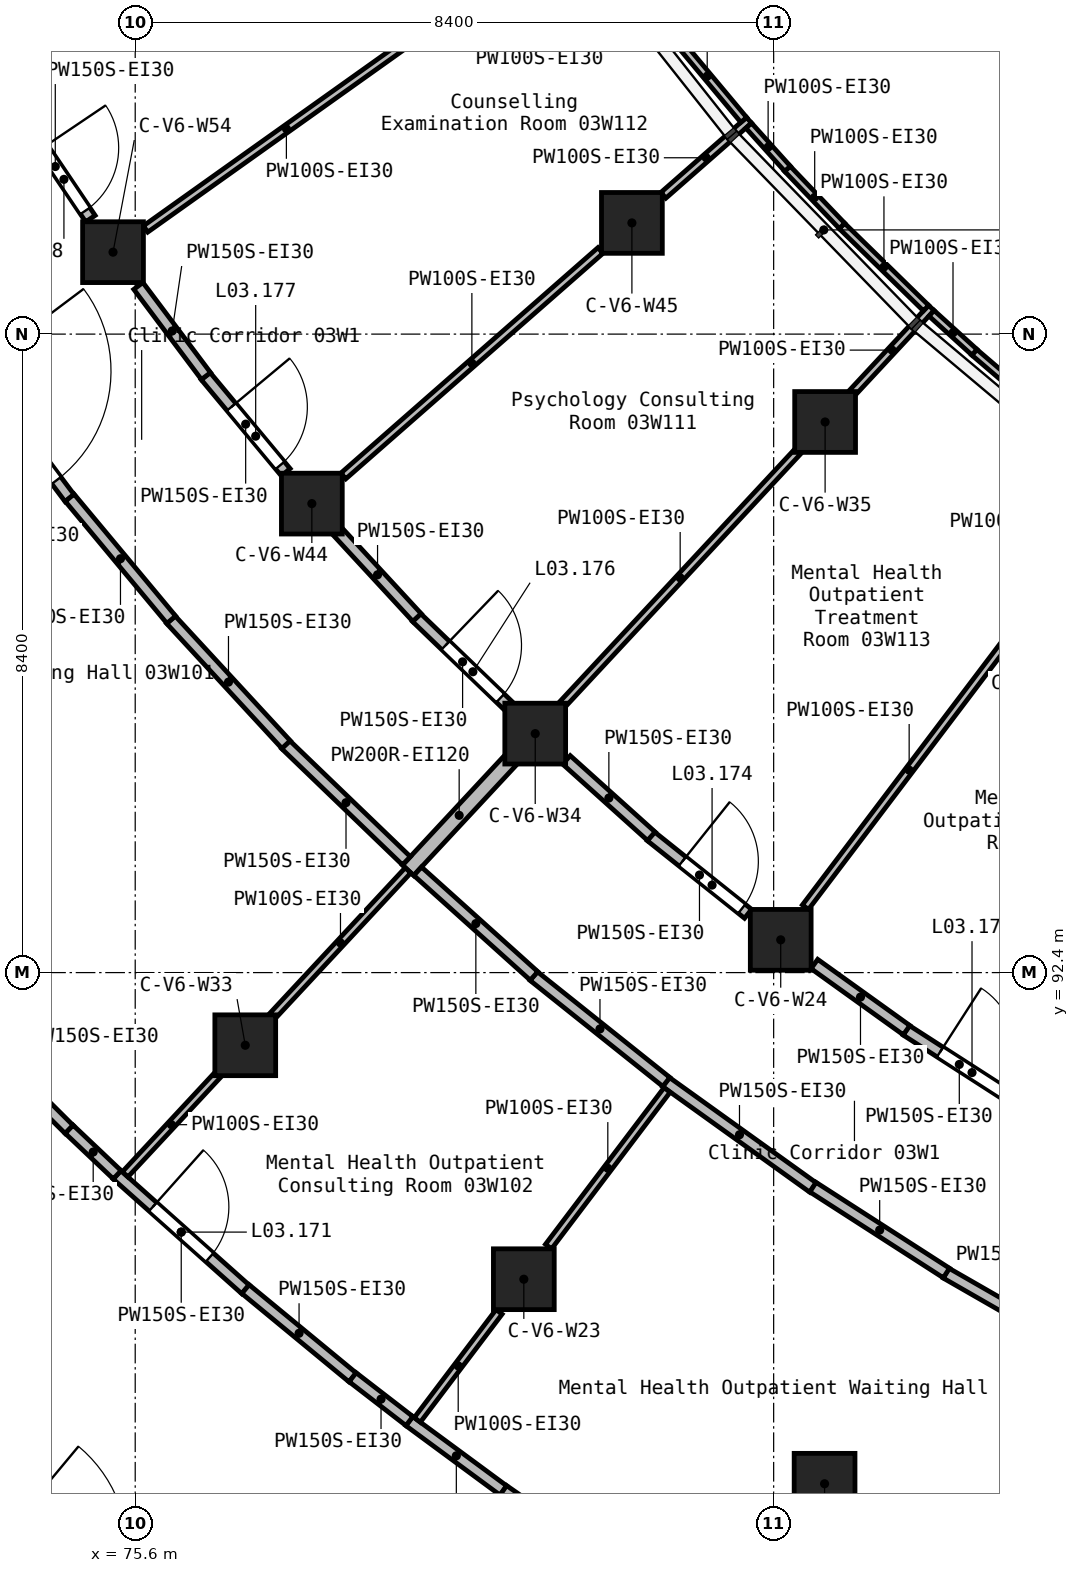
"""IFC4 building model, lengths in metres.
Left out: names, types, materials, properties, quantities, classifications, styles, units other than length and angle.
Written with IfcOpenShell. Run it as: python <this file> out.ifc"""

import sys

from ifc_helpers import new_model, si_unit, direction, frame, frame_2d, origin, origin_2d, place, context, subcontext, project, spatial, rectangle, extrude, element, fill, save


model = new_model("IFC4")
c1 = context("Model", 3, precision=1e-05, world=origin(), true_north=direction((0.0, 1.0)))
c2 = subcontext(c1, "Body", "Model", "MODEL_VIEW")
j1 = project(units=[si_unit("LENGTHUNIT", "METRE"), si_unit("PLANEANGLEUNIT", "RADIAN")], contexts=[c1])
p1 = place(None, origin())
s1 = spatial("IfcSite", under=j1, at=p1, CompositionType="ELEMENT")
p2 = place(p1, origin())
s2 = spatial("IfcBuilding", under=s1, at=p2, CompositionType="ELEMENT")
p3 = place(p2, frame((0.0, 0.0, 16.8)))
s3 = spatial("IfcBuildingStorey", under=s2, at=p3, CompositionType="ELEMENT", Elevation=16.8)
for number, where, z_axis, x_axis in (
    (1, (75.308, 101.878, 0.0), (0.0, 0.0, 1.0), (1.0, 0.0, 0.0)),
    (2, (77.048, 91.444, 0.0), (0.0, 0.0, 1.0), (1.0, 0.0, 0.0)),
    (3, (77.924, 98.57, 0.0), (0.0, 0.0, 1.0), (1.0, 0.0, 0.0)),
    (4, (80.713, 88.366, 0.0), (0.0, 0.0, 1.0), (1.0, 0.0, 0.0)),
    (5, (80.863, 95.544, 0.0), (0.0, 0.0, 1.0), (1.0, 0.0, 0.0)),
    (6, (82.135, 102.263, 0.0), (0.0, 0.0, 1.0), (1.0, 0.0, 0.0)),
    (7, (84.093, 92.831, 0.0), (0.0, 0.0, 1.0), (1.0, 0.0, 0.0)),
    (8, (84.67, 85.675, 0.0), (0.0, 0.0, 1.0), (1.0, 0.0, 0.0)),
    (9, (84.677, 99.644, 0.0), (0.0, 0.0, 1.0), (1.0, 0.0, 0.0)),
):
    element("IfcColumn", number, at=place(p3, frame(where, z_axis=z_axis, x_axis=x_axis)), inside=s3, PredefinedType="COLUMN", context=c2, shape_type="SweptSolid", body=[
        extrude(rectangle(XDim=0.8, YDim=0.8, at=origin_2d()), origin(), (0.0, 0.0, 1.0), 4.2),
    ])
p4 = place(p3, frame((79.19, 93.746, 0.0), z_axis=(0.0, 0.0, 1.0), x_axis=(0.681171780306, 0.732123627344, 0.0)))
e10 = element("IfcWall", 10, at=p4, inside=s3, PredefinedType="SOLIDWALL", context=c2, shape_type="SweptSolid", body=[
    extrude(rectangle(XDim=1.974, YDim=0.2, at=frame_2d((0.987, 0.0))), origin(), (0.0, 0.0, 1.0), 3.9),
])
p5 = place(p3, frame((73.307, 100.547, 0.0), z_axis=(0.0, 0.0, 1.0), x_axis=(0.600377090661, -0.799717043091, 0.0)))
e11 = element("IfcWall", 11, at=p5, inside=s3, PredefinedType="PARTITIONING", context=c2, shape_type="SweptSolid", body=[
    extrude(rectangle(XDim=2.382, YDim=0.15, at=frame_2d((1.191, 0.0))), origin(), (0.0, 0.0, 1.0), 3.9),
])
p6 = place(p5, frame((0.291, 0.0, 0.0)))
e12 = element("IfcOpeningElement", 12, at=p6, cuts=e11, PredefinedType="OPENING", context=c2, shape_type="SweptSolid", body=[
    extrude(rectangle(XDim=1.8, YDim=2.1, at=frame_2d((0.9, 1.05))), frame((0.0, 0.085, 0.0), z_axis=(0.0, -1.0, 0.0), x_axis=(1.0, 0.0, 0.0)), (0.0, 0.0, 1.0), 0.17),
])
p7 = place(p3, frame((82.583, 90.961, 0.0), z_axis=(0.0, 0.0, 1.0), x_axis=(0.812456963848, -0.583021167622, 0.0)))
e13 = element("IfcWall", 13, at=p7, inside=s3, PredefinedType="PARTITIONING", context=c2, shape_type="SweptSolid", body=[
    extrude(rectangle(XDim=2.381, YDim=0.15, at=frame_2d((1.191, 0.0))), origin(), (0.0, 0.0, 1.0), 3.9),
])
p8 = place(p3, frame((80.841, 92.356, 0.0), z_axis=(0.0, 0.0, 1.0), x_axis=(0.781561025488, -0.62382879337, 0.0)))
e14 = element("IfcWall", 14, at=p8, inside=s3, PredefinedType="PARTITIONING", context=c2, shape_type="SweptSolid", body=[
    extrude(rectangle(XDim=2.235, YDim=0.15, at=frame_2d((1.118, 0.0))), origin(), (0.0, 0.0, 1.0), 3.9),
])
p9 = place(p3, frame((77.579, 95.4, 0.0), z_axis=(0.0, 0.0, 1.0), x_axis=(0.720594722174, -0.693356507415, 0.0)))
e15 = element("IfcWall", 15, at=p9, inside=s3, PredefinedType="PARTITIONING", context=c2, shape_type="SweptSolid", body=[
    extrude(rectangle(XDim=2.205, YDim=0.15, at=frame_2d((1.103, 0.0))), origin(), (0.0, 0.0, 1.0), 3.9),
])
p10 = place(p3, frame((76.069, 97.043, 0.0), z_axis=(0.0, 0.0, 1.0), x_axis=(0.678030610295, -0.735033666918, 0.0)))
e16 = element("IfcWall", 16, at=p10, inside=s3, PredefinedType="PARTITIONING", context=c2, shape_type="SweptSolid", body=[
    extrude(rectangle(XDim=2.236, YDim=0.15, at=frame_2d((1.118, 0.0))), origin(), (0.0, 0.0, 1.0), 3.9),
])
p11 = place(p3, frame((86.268, 88.446, 0.0), z_axis=(0.0, 0.0, 1.0), x_axis=(0.867212921502, -0.497937494852, 0.0)))
e17 = element("IfcWall", 17, at=p11, inside=s3, PredefinedType="PARTITIONING", context=c2, shape_type="SweptSolid", body=[
    extrude(rectangle(XDim=2.235, YDim=0.15, at=frame_2d((1.118, 0.0))), origin(), (0.0, 0.0, 1.0), 3.9),
])
p12 = place(p3, frame((79.316, 93.733, 0.0), z_axis=(0.0, 0.0, 1.0), x_axis=(0.74346507851, -0.668774758073, 0.0)))
e18 = element("IfcWall", 18, at=p12, inside=s3, PredefinedType="PARTITIONING", context=c2, shape_type="SweptSolid", body=[
    extrude(rectangle(XDim=2.059, YDim=0.15, at=frame_2d((1.03, 0.0))), origin(), (0.0, 0.0, 1.0), 3.9),
])
p13 = place(p3, frame((74.738, 98.647, 0.0), z_axis=(0.0, 0.0, 1.0), x_axis=(0.640000381719, -0.768374590548, 0.0)))
e19 = element("IfcWall", 19, at=p13, inside=s3, PredefinedType="PARTITIONING", context=c2, shape_type="SweptSolid", body=[
    extrude(rectangle(XDim=2.088, YDim=0.15, at=frame_2d((1.044, 0.0))), origin(), (0.0, 0.0, 1.0), 3.9),
])
p14 = place(p3, frame((84.517, 89.577, 0.0), z_axis=(0.0, 0.0, 1.0), x_axis=(0.840935250807, -0.541135753717, 0.0)))
e20 = element("IfcWall", 20, at=p14, inside=s3, PredefinedType="PARTITIONING", context=c2, shape_type="SweptSolid", body=[
    extrude(rectangle(XDim=2.088, YDim=0.15, at=frame_2d((1.044, 0.0))), origin(), (0.0, 0.0, 1.0), 3.9),
])
p15 = place(p3, frame((75.36, 89.74, 0.0), z_axis=(0.0, 0.0, 1.0), x_axis=(0.746361982095, -0.665540225443, 0.0)))
e21 = element("IfcWall", 21, at=p15, inside=s3, PredefinedType="PARTITIONING", context=c2, shape_type="SweptSolid", body=[
    extrude(rectangle(XDim=2.266, YDim=0.15, at=frame_2d((1.133, 0.0))), origin(), (0.0, 0.0, 1.0), 3.9),
])
p16 = place(p15, frame((0.633, 0.0, 0.0)))
e22 = element("IfcOpeningElement", 22, at=p16, cuts=e21, PredefinedType="OPENING", context=c2, shape_type="SweptSolid", body=[
    extrude(rectangle(XDim=1.0, YDim=2.1, at=frame_2d((0.5, 1.05))), frame((0.0, 0.085, 0.0), z_axis=(0.0, -1.0, 0.0), x_axis=(1.0, 0.0, 0.0)), (0.0, 0.0, 1.0), 0.17),
])
p17 = place(p3, frame((74.086, 103.69, 0.0), z_axis=(0.0, 0.0, 1.0), x_axis=(0.558985889655, -0.829177167538, 0.0)))
e23 = element("IfcWall", 23, at=p17, inside=s3, PredefinedType="PARTITIONING", context=c2, shape_type="SweptSolid", body=[
    extrude(rectangle(XDim=1.654, YDim=0.15, at=frame_2d((0.827, 0.0))), origin(), (0.0, 0.0, 1.0), 3.9),
])
p18 = place(p17, frame((0.53, 0.0, 0.0)))
e24 = element("IfcOpeningElement", 24, at=p18, cuts=e23, PredefinedType="OPENING", context=c2, shape_type="SweptSolid", body=[
    extrude(rectangle(XDim=1.0, YDim=2.1, at=frame_2d((0.5, 1.05))), frame((0.0, 0.085, 0.0), z_axis=(0.0, -1.0, 0.0), x_axis=(1.0, 0.0, 0.0)), (0.0, 0.0, 1.0), 0.17),
])
p19 = place(p3, frame((82.385, 94.194, 0.0), z_axis=(0.0, 0.0, 1.0), x_axis=(0.781756052881, -0.623584375833, 0.0)))
e25 = element("IfcWall", 25, at=p19, inside=s3, PredefinedType="PARTITIONING", context=c2, shape_type="SweptSolid", body=[
    extrude(rectangle(XDim=1.636, YDim=0.15, at=frame_2d((0.818, 0.0))), origin(), (0.0, 0.0, 1.0), 3.9),
])
p20 = place(p19, frame((0.53, 0.0, 0.0)))
e26 = element("IfcOpeningElement", 26, at=p20, cuts=e25, PredefinedType="OPENING", context=c2, shape_type="SweptSolid", body=[
    extrude(rectangle(XDim=1.0, YDim=2.1, at=frame_2d((0.5, 1.05))), frame((0.0, 0.085, 0.0), z_axis=(0.0, -1.0, 0.0), x_axis=(1.0, 0.0, 0.0)), (0.0, 0.0, 1.0), 0.17),
])
p21 = place(p3, frame((85.744, 91.642, 0.0), z_axis=(0.0, 0.0, 1.0), x_axis=(0.840848932624, -0.54126987031, 0.0)))
e27 = element("IfcWall", 27, at=p21, inside=s3, PredefinedType="PARTITIONING", context=c2, shape_type="SweptSolid", body=[
    extrude(rectangle(XDim=1.662, YDim=0.15, at=frame_2d((0.831, 0.0))), origin(), (0.0, 0.0, 1.0), 3.9),
])
p22 = place(p21, frame((0.53, 0.0, 0.0)))
e28 = element("IfcOpeningElement", 28, at=p22, cuts=e27, PredefinedType="OPENING", context=c2, shape_type="SweptSolid", body=[
    extrude(rectangle(XDim=1.0, YDim=2.1, at=frame_2d((0.5, 1.05))), frame((0.0, 0.085, 0.0), z_axis=(0.0, -1.0, 0.0), x_axis=(1.0, 0.0, 0.0)), (0.0, 0.0, 1.0), 0.17),
])
p23 = place(p3, frame((79.301, 97.072, 0.0), z_axis=(0.0, 0.0, 1.0), x_axis=(0.720465115712, -0.69349118022, 0.0)))
e29 = element("IfcWall", 29, at=p23, inside=s3, PredefinedType="PARTITIONING", context=c2, shape_type="SweptSolid", body=[
    extrude(rectangle(XDim=1.684, YDim=0.15, at=frame_2d((0.842, 0.0))), origin(), (0.0, 0.0, 1.0), 3.9),
])
p24 = place(p23, frame((0.53, 0.0, 0.0)))
e30 = element("IfcOpeningElement", 30, at=p24, cuts=e29, PredefinedType="OPENING", context=c2, shape_type="SweptSolid", body=[
    extrude(rectangle(XDim=1.0, YDim=2.1, at=frame_2d((0.5, 1.05))), frame((0.0, 0.085, 0.0), z_axis=(0.0, -1.0, 0.0), x_axis=(1.0, 0.0, 0.0)), (0.0, 0.0, 1.0), 0.17),
])
p25 = place(p3, frame((84.536, 92.513, 0.0), z_axis=(0.0, 0.0, 1.0), x_axis=(0.81243891359, -0.583046320359, 0.0)))
e31 = element("IfcWall", 31, at=p25, inside=s3, PredefinedType="PARTITIONING", context=c2, shape_type="SweptSolid", body=[
    extrude(rectangle(XDim=1.493, YDim=0.15, at=frame_2d((0.747, 0.0))), origin(), (0.0, 0.0, 1.0), 3.9),
])
p26 = place(p3, frame((78.27, 98.195, 0.0), z_axis=(0.0, 0.0, 1.0), x_axis=(0.678273469528, -0.73480956753, 0.0)))
e32 = element("IfcWall", 32, at=p26, inside=s3, PredefinedType="PARTITIONING", context=c2, shape_type="SweptSolid", body=[
    extrude(rectangle(XDim=1.529, YDim=0.15, at=frame_2d((0.764, 0.0))), origin(), (0.0, 0.0, 1.0), 3.9),
])
p27 = place(p3, frame((76.526, 100.249, 0.0), z_axis=(0.0, 0.0, 1.0), x_axis=(0.640038659854, -0.768342706019, 0.0)))
e33 = element("IfcWall", 33, at=p27, inside=s3, PredefinedType="PARTITIONING", context=c2, shape_type="SweptSolid", body=[
    extrude(rectangle(XDim=1.648, YDim=0.15, at=frame_2d((0.824, 0.0))), origin(), (0.0, 0.0, 1.0), 3.9),
])
p28 = place(p27, frame((0.53, 0.0, 0.0)))
e34 = element("IfcOpeningElement", 34, at=p28, cuts=e33, PredefinedType="OPENING", context=c2, shape_type="SweptSolid", body=[
    extrude(rectangle(XDim=1.0, YDim=2.1, at=frame_2d((0.5, 1.05))), frame((0.0, 0.085, 0.0), z_axis=(0.0, -1.0, 0.0), x_axis=(1.0, 0.0, 0.0)), (0.0, 0.0, 1.0), 0.17),
])
p29 = place(p3, frame((75.641, 101.434, 0.0), z_axis=(0.0, 0.0, 1.0), x_axis=(0.60023710435, -0.799822116825, 0.0)))
e35 = element("IfcWall", 35, at=p29, inside=s3, PredefinedType="PARTITIONING", context=c2, shape_type="SweptSolid", body=[
    extrude(rectangle(XDim=1.483, YDim=0.15, at=frame_2d((0.741, 0.0))), origin(), (0.0, 0.0, 1.0), 3.9),
])
p30 = place(p3, frame((81.273, 95.199, 0.0), z_axis=(0.0, 0.0, 1.0), x_axis=(0.743576936712, -0.668650386368, 0.0)))
e36 = element("IfcWall", 36, at=p30, inside=s3, PredefinedType="PARTITIONING", context=c2, shape_type="SweptSolid", body=[
    extrude(rectangle(XDim=1.502, YDim=0.15, at=frame_2d((0.751, 0.0))), origin(), (0.0, 0.0, 1.0), 3.9),
])
p31 = place(p3, frame((77.051, 88.236, 0.0), z_axis=(0.0, 0.0, 1.0), x_axis=(0.771517511576, -0.636208086502, 0.0)))
e37 = element("IfcWall", 37, at=p31, inside=s3, PredefinedType="PARTITIONING", context=c2, shape_type="SweptSolid", body=[
    extrude(rectangle(XDim=1.828, YDim=0.15, at=frame_2d((0.914, 0.0))), origin(), (0.0, 0.0, 1.0), 3.9),
])
p32 = place(p3, frame((79.206, 86.5, 0.0), z_axis=(0.0, 0.0, 1.0), x_axis=(0.804960127747, -0.593328907721, 0.0)))
e38 = element("IfcWall", 38, at=p32, inside=s3, PredefinedType="PARTITIONING", context=c2, shape_type="SweptSolid", body=[
    extrude(rectangle(XDim=1.539, YDim=0.15, at=frame_2d((0.77, 0.0))), origin(), (0.0, 0.0, 1.0), 3.9),
])
p33 = place(p3, frame((73.851, 91.211, 0.0), z_axis=(0.0, 0.0, 1.0), x_axis=(0.709168733207, -0.70503879882, 0.0)))
e39 = element("IfcWall", 39, at=p33, inside=s3, PredefinedType="PARTITIONING", context=c2, shape_type="SweptSolid", body=[
    extrude(rectangle(XDim=1.241, YDim=0.15, at=frame_2d((0.621, 0.0))), origin(), (0.0, 0.0, 1.0), 3.9),
])
p34 = place(p3, frame((80.444, 85.589, 0.0), z_axis=(0.0, 0.0, 1.0), x_axis=(0.821096473197, -0.570789437274, 0.0)))
e40 = element("IfcWall", 40, at=p34, inside=s3, PredefinedType="PARTITIONING", context=c2, shape_type="SweptSolid", body=[
    extrude(rectangle(XDim=1.093, YDim=0.15, at=frame_2d((0.546, 0.0))), origin(), (0.0, 0.0, 1.0), 3.9),
])
p35 = place(p3, frame((78.46, 87.077, 0.0), z_axis=(0.0, 0.0, 1.0), x_axis=(0.791671493317, -0.610947008069, 0.0)))
e41 = element("IfcWall", 41, at=p35, inside=s3, PredefinedType="PARTITIONING", context=c2, shape_type="SweptSolid", body=[
    extrude(rectangle(XDim=0.944, YDim=0.15, at=frame_2d((0.472, 0.0))), origin(), (0.0, 0.0, 1.0), 3.9),
])
p36 = place(p3, frame((74.731, 90.339, 0.0), z_axis=(0.0, 0.0, 1.0), x_axis=(0.725923200466, -0.687775767984, 0.0)))
e42 = element("IfcWall", 42, at=p36, inside=s3, PredefinedType="PARTITIONING", context=c2, shape_type="SweptSolid", body=[
    extrude(rectangle(XDim=0.87, YDim=0.15, at=frame_2d((0.435, 0.0))), origin(), (0.0, 0.0, 1.0), 3.9),
])
p37 = place(p3, frame((84.418, 93.26, 0.0), z_axis=(0.0, 0.0, 1.0), x_axis=(0.603501117064, 0.797362152163, 0.0)))
e43 = element("IfcWall", 43, at=p37, inside=s3, PredefinedType="PARTITIONING", context=c2, shape_type="SweptSolid", body=[
    extrude(rectangle(XDim=4.522, YDim=0.1, at=frame_2d((2.261, 0.0))), origin(), (0.0, 0.0, 1.0), 3.9),
])
p38 = place(p3, frame((78.338, 98.933, 0.0), z_axis=(0.0, 0.0, 1.0), x_axis=(0.751823288541, 0.659364650863, 0.0)))
e44 = element("IfcWall", 44, at=p38, inside=s3, PredefinedType="PARTITIONING", context=c2, shape_type="SweptSolid", body=[
    extrude(rectangle(XDim=4.5, YDim=0.1, at=frame_2d((2.25, 0.0))), origin(), (0.0, 0.0, 1.0), 3.9),
])
p39 = place(p3, frame((82.549, 102.626, 0.0), z_axis=(0.0, 0.0, 1.0), x_axis=(0.751798799024, 0.659392573347, 0.0)))
e45 = element("IfcWall", 45, at=p39, inside=s3, PredefinedType="PARTITIONING", context=c2, shape_type="SweptSolid", body=[
    extrude(rectangle(XDim=1.498, YDim=0.1, at=frame_2d((0.749, 0.0))), origin(), (0.0, 0.0, 1.0), 3.9),
])
p40 = place(p3, frame((75.736, 102.183, 0.0), z_axis=(0.0, 0.0, 1.0), x_axis=(0.8147152487, 0.579861245072, 0.0)))
e46 = element("IfcWall", 46, at=p40, inside=s3, PredefinedType="PARTITIONING", context=c2, shape_type="SweptSolid", body=[
    extrude(rectangle(XDim=4.548, YDim=0.1, at=frame_2d((2.274, 0.0))), origin(), (0.0, 0.0, 1.0), 3.9),
])
p41 = place(p3, frame((81.227, 95.935, 0.0), z_axis=(0.0, 0.0, 1.0), x_axis=(0.681211440492, 0.732086725288, 0.0)))
e47 = element("IfcWall", 47, at=p41, inside=s3, PredefinedType="PARTITIONING", context=c2, shape_type="SweptSolid", body=[
    extrude(rectangle(XDim=4.53, YDim=0.1, at=frame_2d((2.265, 0.0))), origin(), (0.0, 0.0, 1.0), 3.9),
])
p42 = place(p3, frame((85.041, 100.034, 0.0), z_axis=(0.0, 0.0, 1.0), x_axis=(0.681296599079, 0.732007475428, 0.0)))
e48 = element("IfcWall", 48, at=p42, inside=s3, PredefinedType="PARTITIONING", context=c2, shape_type="SweptSolid", body=[
    extrude(rectangle(XDim=1.517, YDim=0.1, at=frame_2d((0.758, 0.0))), origin(), (0.0, 0.0, 1.0), 3.9),
])
p43 = place(p3, frame((75.468, 89.746, 0.0), z_axis=(0.0, 0.0, 1.0), x_axis=(0.681143154038, 0.732150260334, 0.0)))
e49 = element("IfcWall", 49, at=p43, inside=s3, PredefinedType="PARTITIONING", context=c2, shape_type="SweptSolid", body=[
    extrude(rectangle(XDim=1.785, YDim=0.1, at=frame_2d((0.893, 0.0))), origin(), (0.0, 0.0, 1.0), 3.9),
])
p44 = place(p3, frame((77.412, 91.835, 0.0), z_axis=(0.0, 0.0, 1.0), x_axis=(0.681147107729, 0.732146582067, 0.0)))
e50 = element("IfcWall", 50, at=p44, inside=s3, PredefinedType="PARTITIONING", context=c2, shape_type="SweptSolid", body=[
    extrude(rectangle(XDim=2.609, YDim=0.1, at=frame_2d((1.304, 0.0))), origin(), (0.0, 0.0, 1.0), 3.9),
])
p45 = place(p3, frame((79.312, 86.515, 0.0), z_axis=(0.0, 0.0, 1.0), x_axis=(0.603588624137, 0.797295912954, 0.0)))
e51 = element("IfcWall", 51, at=p45, inside=s3, PredefinedType="PARTITIONING", context=c2, shape_type="SweptSolid", body=[
    extrude(rectangle(XDim=1.782, YDim=0.1, at=frame_2d((0.891, 0.0))), origin(), (0.0, 0.0, 1.0), 3.9),
])
p46 = place(p3, frame((81.038, 88.796, 0.0), z_axis=(0.0, 0.0, 1.0), x_axis=(0.603561177332, 0.797316690668, 0.0)))
e52 = element("IfcWall", 52, at=p46, inside=s3, PredefinedType="PARTITIONING", context=c2, shape_type="SweptSolid", body=[
    extrude(rectangle(XDim=2.584, YDim=0.1, at=frame_2d((1.292, 0.0))), origin(), (0.0, 0.0, 1.0), 3.9),
])
p47 = place(p3, frame((84.897, 102.224, 0.0), z_axis=(0.0, 0.0, 1.0), x_axis=(0.715491637519, -0.698621297013, 0.0)))
e53 = element("IfcWall", 53, at=p47, inside=s3, PredefinedType="PARTITIONING", context=c2, shape_type="SweptSolid", body=[
    extrude(rectangle(XDim=1.548, YDim=0.1, at=frame_2d((0.774, 0.0))), origin(), (0.0, 0.0, 1.0), 3.9),
])
p48 = place(p3, frame((82.645, 104.768, 0.0), z_axis=(0.0, 0.0, 1.0), x_axis=(0.641529064264, -0.767098728785, 0.0)))
e54 = element("IfcWall", 54, at=p48, inside=s3, PredefinedType="PARTITIONING", context=c2, shape_type="SweptSolid", body=[
    extrude(rectangle(XDim=1.499, YDim=0.1, at=frame_2d((0.75, 0.0))), origin(), (0.0, 0.0, 1.0), 3.9),
])
p49 = place(p3, frame((84.18, 102.976, 0.0), z_axis=(0.0, 0.0, 1.0), x_axis=(0.691094804644, -0.722764118502, 0.0)))
e55 = element("IfcWall", 55, at=p49, inside=s3, PredefinedType="PARTITIONING", context=c2, shape_type="SweptSolid", body=[
    extrude(rectangle(XDim=1.041, YDim=0.1, at=frame_2d((0.521, 0.0))), origin(), (0.0, 0.0, 1.0), 3.9),
])
p50 = place(p3, frame((86.64, 100.562, 0.0), z_axis=(0.0, 0.0, 1.0), x_axis=(0.759638737838, -0.650345283658, 0.0)))
e56 = element("IfcWall", 56, at=p50, inside=s3, PredefinedType="PARTITIONING", context=c2, shape_type="SweptSolid", body=[
    extrude(rectangle(XDim=0.992, YDim=0.1, at=frame_2d((0.496, 0.0))), origin(), (0.0, 0.0, 1.0), 3.9),
])
p51 = place(p3, frame((83.672, 103.543, 0.0), z_axis=(0.0, 0.0, 1.0), x_axis=(0.66903540409, -0.743230534945, 0.0)))
e57 = element("IfcWall", 57, at=p51, inside=s3, PredefinedType="PARTITIONING", context=c2, shape_type="SweptSolid", body=[
    extrude(rectangle(XDim=0.763, YDim=0.1, at=frame_2d((0.382, 0.0))), origin(), (0.0, 0.0, 1.0), 3.9),
])
p52 = place(p3, frame((86.077, 101.074, 0.0), z_axis=(0.0, 0.0, 1.0), x_axis=(0.740693092669, -0.671843540173, 0.0)))
e58 = element("IfcWall", 58, at=p52, inside=s3, PredefinedType="PARTITIONING", context=c2, shape_type="SweptSolid", body=[
    extrude(rectangle(XDim=0.762, YDim=0.1, at=frame_2d((0.381, 0.0))), origin(), (0.0, 0.0, 1.0), 3.9),
])
p53 = place(p6, origin())
e59 = element("IfcDoor", 59, at=p53, inside=s3, OperationType="DOUBLE_DOOR_SINGLE_SWING", PredefinedType="DOOR", context=c2, shape_type="SweptSolid", body=[
    extrude(rectangle(XDim=1.8, YDim=2.1, at=frame_2d((0.9, 1.05))), frame((0.0, 0.025, 0.0), z_axis=(0.0, -1.0, 0.0), x_axis=(1.0, 0.0, 0.0)), (0.0, 0.0, 1.0), 0.05),
])
fill(e12, e59)
p54 = place(p16, origin())
e60 = element("IfcDoor", 60, at=p54, inside=s3, OperationType="SINGLE_SWING_LEFT", PredefinedType="DOOR", context=c2, shape_type="SweptSolid", body=[
    extrude(rectangle(XDim=1.0, YDim=2.1, at=frame_2d((0.5, 1.05))), frame((0.0, 0.025, 0.0), z_axis=(0.0, -1.0, 0.0), x_axis=(1.0, 0.0, 0.0)), (0.0, 0.0, 1.0), 0.05),
])
fill(e22, e60)
p55 = place(p22, origin())
e61 = element("IfcDoor", 61, at=p55, inside=s3, OperationType="SINGLE_SWING_RIGHT", PredefinedType="DOOR", context=c2, shape_type="SweptSolid", body=[
    extrude(rectangle(XDim=1.0, YDim=2.1, at=frame_2d((0.5, 1.05))), frame((0.0, 0.025, 0.0), z_axis=(0.0, -1.0, 0.0), x_axis=(1.0, 0.0, 0.0)), (0.0, 0.0, 1.0), 0.05),
])
fill(e28, e61)
p56 = place(p20, origin())
e62 = element("IfcDoor", 62, at=p56, inside=s3, OperationType="SINGLE_SWING_RIGHT", PredefinedType="DOOR", context=c2, shape_type="SweptSolid", body=[
    extrude(rectangle(XDim=1.0, YDim=2.1, at=frame_2d((0.5, 1.05))), frame((0.0, 0.025, 0.0), z_axis=(0.0, -1.0, 0.0), x_axis=(1.0, 0.0, 0.0)), (0.0, 0.0, 1.0), 0.05),
])
fill(e26, e62)
p57 = place(p24, origin())
e63 = element("IfcDoor", 63, at=p57, inside=s3, OperationType="SINGLE_SWING_RIGHT", PredefinedType="DOOR", context=c2, shape_type="SweptSolid", body=[
    extrude(rectangle(XDim=1.0, YDim=2.1, at=frame_2d((0.5, 1.05))), frame((0.0, 0.025, 0.0), z_axis=(0.0, -1.0, 0.0), x_axis=(1.0, 0.0, 0.0)), (0.0, 0.0, 1.0), 0.05),
])
fill(e30, e63)
p58 = place(p28, origin())
e64 = element("IfcDoor", 64, at=p58, inside=s3, OperationType="SINGLE_SWING_RIGHT", PredefinedType="DOOR", context=c2, shape_type="SweptSolid", body=[
    extrude(rectangle(XDim=1.0, YDim=2.1, at=frame_2d((0.5, 1.05))), frame((0.0, 0.025, 0.0), z_axis=(0.0, -1.0, 0.0), x_axis=(1.0, 0.0, 0.0)), (0.0, 0.0, 1.0), 0.05),
])
fill(e34, e64)
p59 = place(p18, origin())
e65 = element("IfcDoor", 65, at=p59, inside=s3, OperationType="SINGLE_SWING_RIGHT", PredefinedType="DOOR", context=c2, shape_type="SweptSolid", body=[
    extrude(rectangle(XDim=1.0, YDim=2.1, at=frame_2d((0.5, 1.05))), frame((0.0, 0.025, 0.0), z_axis=(0.0, -1.0, 0.0), x_axis=(1.0, 0.0, 0.0)), (0.0, 0.0, 1.0), 0.05),
])
fill(e24, e65)
save(model, sys.argv[1])
